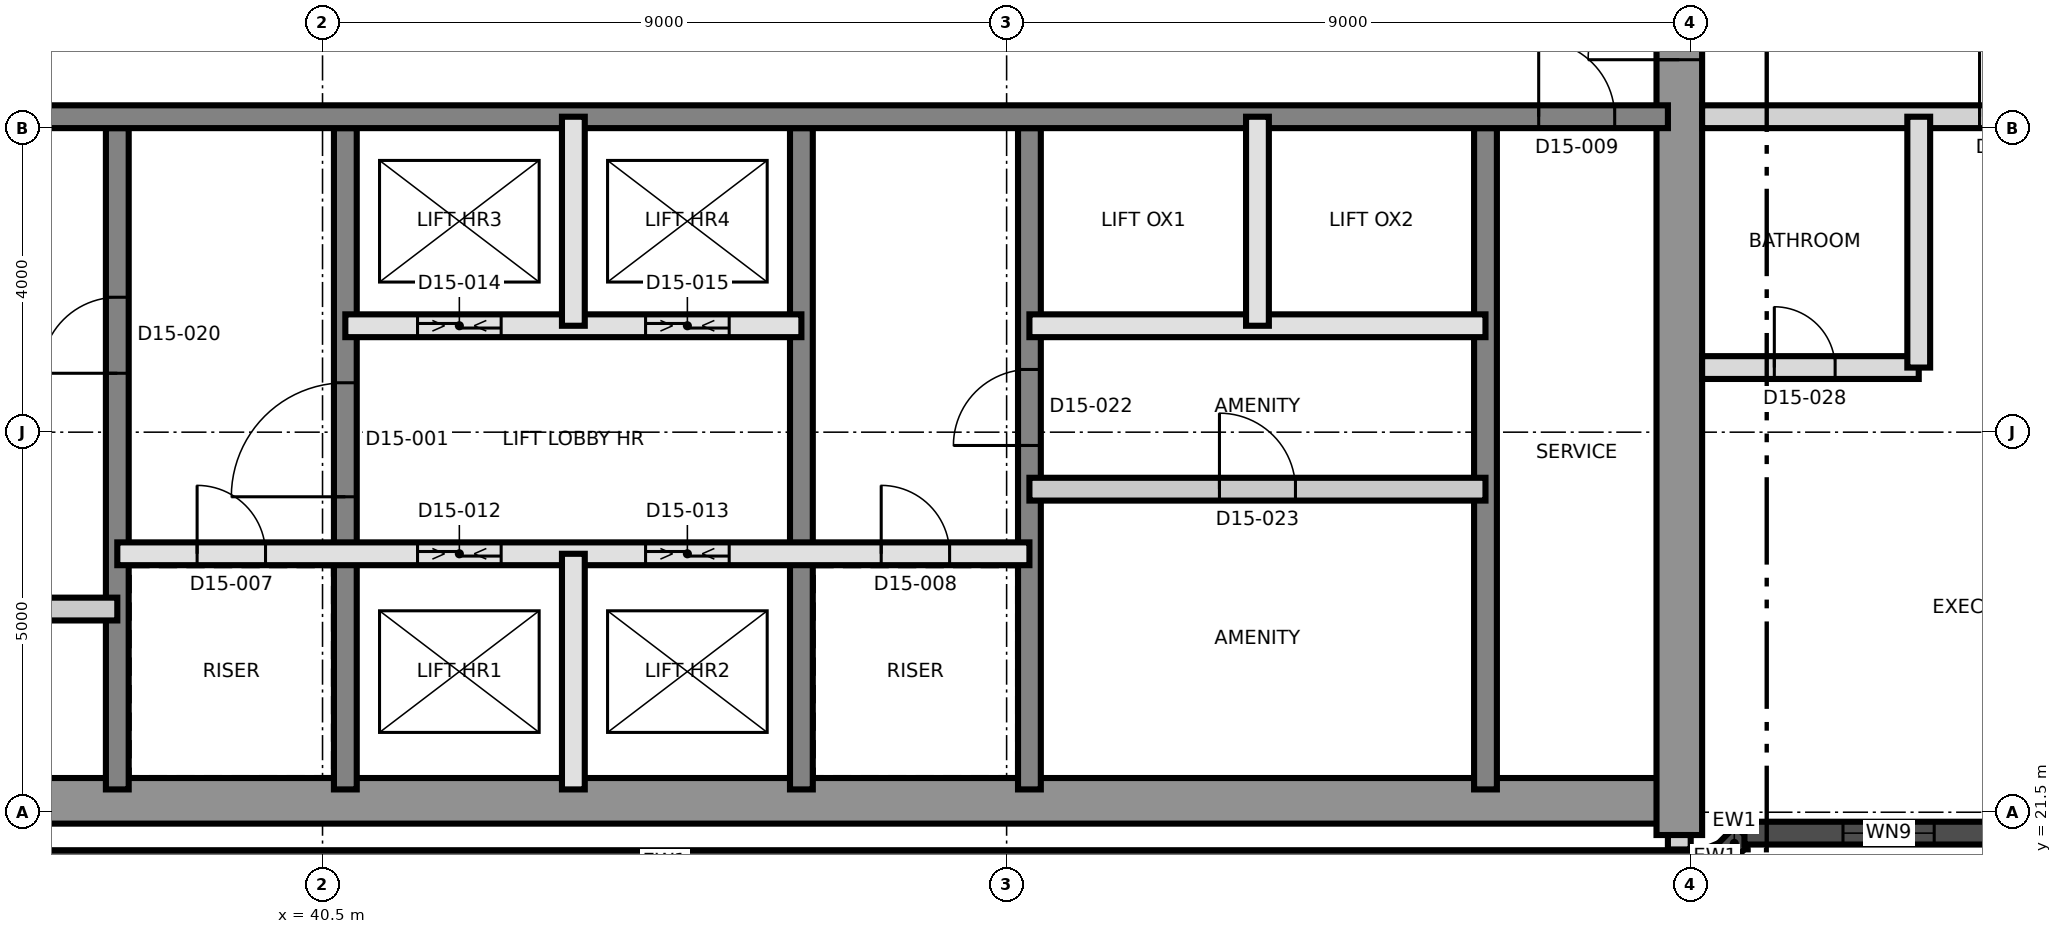
"""IFC4 building model, lengths in metres.
Left out: names, types, materials, properties, quantities, classifications, styles, units other than length and angle.
Written with IfcOpenShell. Run it as: python <this file> out.ifc"""

import sys

from ifc_helpers import new_model, si_unit, direction, frame, frame_2d, origin, place, context, subcontext, project, spatial, rectangle, extrude, element, fill, save


model = new_model("IFC4")
c1 = context("Model", 3, precision=1e-05, world=origin(), true_north=direction((0.0, 1.0)))
c2 = subcontext(c1, "Body", "Model", "MODEL_VIEW")
j1 = project(units=[si_unit("LENGTHUNIT", "METRE"), si_unit("PLANEANGLEUNIT", "RADIAN")], contexts=[c1])
p1 = place(None, origin())
s1 = spatial("IfcSite", under=j1, at=p1, CompositionType="ELEMENT")
p2 = place(p1, origin())
s2 = spatial("IfcBuilding", under=s1, at=p2, CompositionType="ELEMENT")
p3 = place(p2, frame((0.0, 0.0, 153.3)))
s3 = spatial("IfcBuildingStorey", under=s2, at=p3, CompositionType="ELEMENT", Elevation=153.3)
p4 = place(p3, frame((31.2, 21.65, 0.0), z_axis=(0.0, 0.0, 1.0), x_axis=(1.0, 0.0, 0.0)))
e1 = element("IfcWall", 1, at=p4, inside=s3, PredefinedType="SHEAR", context=c2, shape_type="SweptSolid", body=[
    extrude(rectangle(XDim=27.0, YDim=0.6, at=frame_2d((13.5, 0.0))), origin(), (0.0, 0.0, 1.0), 3.7),
])
p5 = place(p3, frame((58.35, 21.2, 0.0), z_axis=(0.0, 0.0, 1.0), x_axis=(0.0, 1.0, 0.0)))
e2 = element("IfcWall", 2, at=p5, inside=s3, PredefinedType="SHEAR", context=c2, shape_type="SweptSolid", body=[
    extrude(rectangle(XDim=18.6, YDim=0.6, at=frame_2d((9.3, 0.0))), origin(), (0.0, 0.0, 1.0), 3.7),
])
p6 = place(p5, frame((10.2, 0.0, 0.0)))
e3 = element("IfcOpeningElement", 3, at=p6, cuts=e2, PredefinedType="OPENING", context=c2, shape_type="SweptSolid", body=[
    extrude(rectangle(XDim=1.2, YDim=2.1, at=frame_2d((0.6, 1.05))), frame((0.0, 0.31, 0.0), z_axis=(0.0, -1.0, 0.0), x_axis=(1.0, 0.0, 0.0)), (0.0, 0.0, 1.0), 0.62),
])
p7 = place(p3, frame((37.8, 21.8, 0.0), z_axis=(0.0, 0.0, 1.0), x_axis=(0.0, 1.0, 0.0)))
e4 = element("IfcWall", 4, at=p7, inside=s3, PredefinedType="SHEAR", context=c2, shape_type="SweptSolid", body=[
    extrude(rectangle(XDim=8.7, YDim=0.3, at=frame_2d((4.35, 0.0))), origin(), (0.0, 0.0, 1.0), 3.7),
])
p8 = place(p7, frame((5.475, 0.0, 0.0)))
e5 = element("IfcOpeningElement", 5, at=p8, cuts=e4, PredefinedType="OPENING", context=c2, shape_type="SweptSolid", body=[
    extrude(rectangle(XDim=1.0, YDim=2.1, at=frame_2d((0.5, 1.05))), frame((0.0, 0.16, 0.0), z_axis=(0.0, -1.0, 0.0), x_axis=(1.0, 0.0, 0.0)), (0.0, 0.0, 1.0), 0.32),
])
p9 = place(p3, frame((40.8, 21.8, 0.0), z_axis=(0.0, 0.0, 1.0), x_axis=(0.0, 1.0, 0.0)))
e6 = element("IfcWall", 6, at=p9, inside=s3, PredefinedType="SHEAR", context=c2, shape_type="SweptSolid", body=[
    extrude(rectangle(XDim=8.7, YDim=0.3, at=frame_2d((4.35, 0.0))), origin(), (0.0, 0.0, 1.0), 3.7),
])
p10 = place(p9, frame((3.85, 0.0, 0.0)))
e7 = element("IfcOpeningElement", 7, at=p10, cuts=e6, PredefinedType="OPENING", context=c2, shape_type="SweptSolid", body=[
    extrude(rectangle(XDim=1.5, YDim=2.1, at=frame_2d((0.75, 1.05))), frame((0.0, 0.16, 0.0), z_axis=(0.0, -1.0, 0.0), x_axis=(1.0, 0.0, 0.0)), (0.0, 0.0, 1.0), 0.32),
])
p11 = place(p3, frame((46.8, 21.8, 0.0), z_axis=(0.0, 0.0, 1.0), x_axis=(0.0, 1.0, 0.0)))
e8 = element("IfcWall", 8, at=p11, inside=s3, PredefinedType="SHEAR", context=c2, shape_type="SweptSolid", body=[
    extrude(rectangle(XDim=8.7, YDim=0.3, at=frame_2d((4.35, 0.0))), origin(), (0.0, 0.0, 1.0), 3.7),
])
p12 = place(p3, frame((49.8, 21.8, 0.0), z_axis=(0.0, 0.0, 1.0), x_axis=(0.0, 1.0, 0.0)))
e9 = element("IfcWall", 9, at=p12, inside=s3, PredefinedType="SHEAR", context=c2, shape_type="SweptSolid", body=[
    extrude(rectangle(XDim=8.7, YDim=0.3, at=frame_2d((4.35, 0.0))), origin(), (0.0, 0.0, 1.0), 3.7),
])
p13 = place(p12, frame((4.525, 0.0, 0.0)))
e10 = element("IfcOpeningElement", 10, at=p13, cuts=e9, PredefinedType="OPENING", context=c2, shape_type="SweptSolid", body=[
    extrude(rectangle(XDim=1.0, YDim=2.1, at=frame_2d((0.5, 1.05))), frame((0.0, 0.16, 0.0), z_axis=(0.0, -1.0, 0.0), x_axis=(1.0, 0.0, 0.0)), (0.0, 0.0, 1.0), 0.32),
])
p14 = place(p3, frame((55.8, 21.8, 0.0), z_axis=(0.0, 0.0, 1.0), x_axis=(0.0, 1.0, 0.0)))
e11 = element("IfcWall", 11, at=p14, inside=s3, PredefinedType="SHEAR", context=c2, shape_type="SweptSolid", body=[
    extrude(rectangle(XDim=8.7, YDim=0.3, at=frame_2d((4.35, 0.0))), origin(), (0.0, 0.0, 1.0), 3.7),
])
p15 = place(p3, frame((31.8, 30.65, 0.0), z_axis=(0.0, 0.0, 1.0), x_axis=(1.0, 0.0, 0.0)))
e12 = element("IfcWall", 12, at=p15, inside=s3, PredefinedType="SHEAR", context=c2, shape_type="SweptSolid", body=[
    extrude(rectangle(XDim=26.4, YDim=0.3, at=frame_2d((13.2, 0.0))), origin(), (0.0, 0.0, 1.0), 3.7),
])
p16 = place(p15, frame((24.7, 0.0, 0.0)))
e13 = element("IfcOpeningElement", 13, at=p16, cuts=e12, PredefinedType="OPENING", context=c2, shape_type="SweptSolid", body=[
    extrude(rectangle(XDim=1.0, YDim=2.1, at=frame_2d((0.5, 1.05))), frame((0.0, 0.16, 0.0), z_axis=(0.0, -1.0, 0.0), x_axis=(1.0, 0.0, 0.0)), (0.0, 0.0, 1.0), 0.32),
])
p17 = place(p3, frame((31.36, 20.85, 0.0), z_axis=(0.0, 0.0, 1.0), x_axis=(1.0, 0.0, 0.0)))
e14 = element("IfcWall", 14, at=p17, inside=s3, PredefinedType="SOLIDWALL", context=c2, shape_type="SweptSolid", body=[
    extrude(rectangle(XDim=27.281, YDim=0.3, at=frame_2d((13.64, 0.0))), origin(), (0.0, 0.0, 1.0), 3.4),
])
p18 = place(p3, frame((58.698, 20.861, 0.0), z_axis=(0.0, 0.0, 1.0), x_axis=(0.923757413239, 0.38297812142, 0.0)))
e15 = element("IfcWall", 15, at=p18, inside=s3, PredefinedType="SOLIDWALL", context=c2, shape_type="SweptSolid", body=[
    extrude(rectangle(XDim=0.275, YDim=0.3, at=frame_2d((0.138, 0.0))), origin(), (0.0, 0.0, 1.0), 3.4),
])
p19 = place(p3, frame((58.952, 20.967, 0.0), z_axis=(0.0, 0.0, 1.0), x_axis=(0.702144810536, 0.712034174065, 0.0)))
e16 = element("IfcWall", 16, at=p19, inside=s3, PredefinedType="SOLIDWALL", context=c2, shape_type="SweptSolid", body=[
    extrude(rectangle(XDim=0.346, YDim=0.3, at=frame_2d((0.173, 0.0))), origin(), (0.0, 0.0, 1.0), 3.4),
])
p20 = place(p3, frame((59.207, 21.225, 0.0), z_axis=(0.0, 0.0, 1.0), x_axis=(1.0, 0.0, 0.0)))
e17 = element("IfcWall", 17, at=p20, inside=s3, PredefinedType="SOLIDWALL", context=c2, shape_type="SweptSolid", body=[
    extrude(rectangle(XDim=8.213, YDim=0.3, at=frame_2d((4.106, 0.0))), origin(), (0.0, 0.0, 1.0), 3.4),
])
p21 = place(p20, frame((1.297, 0.0, 0.9)))
e18 = element("IfcOpeningElement", 18, at=p21, cuts=e17, PredefinedType="OPENING", context=c2, shape_type="SweptSolid", body=[
    extrude(rectangle(XDim=1.2, YDim=1.5, at=frame_2d((0.6, 0.75))), frame((0.0, 0.16, 0.0), z_axis=(0.0, -1.0, 0.0), x_axis=(1.0, 0.0, 0.0)), (0.0, 0.0, 1.0), 0.32),
])
p22 = place(p20, frame((4.003, 0.0, 0.9)))
e19 = element("IfcOpeningElement", 19, at=p22, cuts=e17, PredefinedType="OPENING", context=c2, shape_type="SweptSolid", body=[
    extrude(rectangle(XDim=3.6, YDim=1.5, at=frame_2d((1.8, 0.75))), frame((0.0, 0.16, 0.0), z_axis=(0.0, -1.0, 0.0), x_axis=(1.0, 0.0, 0.0)), (0.0, 0.0, 1.0), 0.32),
])
p23 = place(p3, frame((31.8, 24.173, 0.0), z_axis=(0.0, 0.0, 1.0), x_axis=(1.0, 0.0, 0.0)))
e20 = element("IfcWall", 20, at=p23, inside=s3, PredefinedType="PARTITIONING", context=c2, shape_type="SweptSolid", body=[
    extrude(rectangle(XDim=6.0, YDim=0.3, at=frame_2d((3.0, 0.0))), origin(), (0.0, 0.0, 1.0), 3.4),
])
p24 = place(p23, frame((2.5, 0.0, 0.0)))
e21 = element("IfcOpeningElement", 21, at=p24, cuts=e20, PredefinedType="OPENING", context=c2, shape_type="SweptSolid", body=[
    extrude(rectangle(XDim=1.0, YDim=2.1, at=frame_2d((0.5, 1.05))), frame((0.0, 0.16, 0.0), z_axis=(0.0, -1.0, 0.0), x_axis=(1.0, 0.0, 0.0)), (0.0, 0.0, 1.0), 0.32),
])
p25 = place(p3, frame((37.8, 24.9, 0.0), z_axis=(0.0, 0.0, 1.0), x_axis=(1.0, 0.0, 0.0)))
e22 = element("IfcWall", 22, at=p25, inside=s3, PredefinedType="SOLIDWALL", context=c2, shape_type="SweptSolid", body=[
    extrude(rectangle(XDim=12.0, YDim=0.3, at=frame_2d((6.0, 0.0))), origin(), (0.0, 0.0, 1.0), 3.4),
])
p26 = place(p25, frame((1.05, 0.0, 0.0)))
e23 = element("IfcOpeningElement", 23, at=p26, cuts=e22, PredefinedType="OPENING", context=c2, shape_type="SweptSolid", body=[
    extrude(rectangle(XDim=0.9, YDim=2.1, at=frame_2d((0.45, 1.05))), frame((0.0, 0.16, 0.0), z_axis=(0.0, -1.0, 0.0), x_axis=(1.0, 0.0, 0.0)), (0.0, 0.0, 1.0), 0.32),
])
p27 = place(p25, frame((10.05, 0.0, 0.0)))
e24 = element("IfcOpeningElement", 24, at=p27, cuts=e22, PredefinedType="OPENING", context=c2, shape_type="SweptSolid", body=[
    extrude(rectangle(XDim=0.9, YDim=2.1, at=frame_2d((0.45, 1.05))), frame((0.0, 0.16, 0.0), z_axis=(0.0, -1.0, 0.0), x_axis=(1.0, 0.0, 0.0)), (0.0, 0.0, 1.0), 0.32),
])
p28 = place(p25, frame((3.95, 0.0, 0.0)))
e25 = element("IfcOpeningElement", 25, at=p28, cuts=e22, PredefinedType="OPENING", context=c2, shape_type="SweptSolid", body=[
    extrude(rectangle(XDim=1.1, YDim=2.4, at=frame_2d((0.55, 1.2))), frame((0.0, 0.16, 0.0), z_axis=(0.0, -1.0, 0.0), x_axis=(1.0, 0.0, 0.0)), (0.0, 0.0, 1.0), 0.32),
])
p29 = place(p25, frame((6.95, 0.0, 0.0)))
e26 = element("IfcOpeningElement", 26, at=p29, cuts=e22, PredefinedType="OPENING", context=c2, shape_type="SweptSolid", body=[
    extrude(rectangle(XDim=1.1, YDim=2.4, at=frame_2d((0.55, 1.2))), frame((0.0, 0.16, 0.0), z_axis=(0.0, -1.0, 0.0), x_axis=(1.0, 0.0, 0.0)), (0.0, 0.0, 1.0), 0.32),
])
p30 = place(p3, frame((49.8, 25.75, 0.0), z_axis=(0.0, 0.0, 1.0), x_axis=(1.0, 0.0, 0.0)))
e27 = element("IfcWall", 27, at=p30, inside=s3, PredefinedType="PARTITIONING", context=c2, shape_type="SweptSolid", body=[
    extrude(rectangle(XDim=6.0, YDim=0.3, at=frame_2d((3.0, 0.0))), origin(), (0.0, 0.0, 1.0), 3.4),
])
p31 = place(p30, frame((2.5, 0.0, 0.0)))
e28 = element("IfcOpeningElement", 28, at=p31, cuts=e27, PredefinedType="OPENING", context=c2, shape_type="SweptSolid", body=[
    extrude(rectangle(XDim=1.0, YDim=2.1, at=frame_2d((0.5, 1.05))), frame((0.0, 0.16, 0.0), z_axis=(0.0, -1.0, 0.0), x_axis=(1.0, 0.0, 0.0)), (0.0, 0.0, 1.0), 0.32),
])
p32 = place(p3, frame((40.8, 27.9, 0.0), z_axis=(0.0, 0.0, 1.0), x_axis=(1.0, 0.0, 0.0)))
e29 = element("IfcWall", 29, at=p32, inside=s3, PredefinedType="SOLIDWALL", context=c2, shape_type="SweptSolid", body=[
    extrude(rectangle(XDim=6.0, YDim=0.3, at=frame_2d((3.0, 0.0))), origin(), (0.0, 0.0, 1.0), 3.4),
])
p33 = place(p32, frame((0.95, 0.0, 0.0)))
e30 = element("IfcOpeningElement", 30, at=p33, cuts=e29, PredefinedType="OPENING", context=c2, shape_type="SweptSolid", body=[
    extrude(rectangle(XDim=1.1, YDim=2.4, at=frame_2d((0.55, 1.2))), frame((0.0, 0.16, 0.0), z_axis=(0.0, -1.0, 0.0), x_axis=(1.0, 0.0, 0.0)), (0.0, 0.0, 1.0), 0.32),
])
p34 = place(p32, frame((3.95, 0.0, 0.0)))
e31 = element("IfcOpeningElement", 31, at=p34, cuts=e29, PredefinedType="OPENING", context=c2, shape_type="SweptSolid", body=[
    extrude(rectangle(XDim=1.1, YDim=2.4, at=frame_2d((0.55, 1.2))), frame((0.0, 0.16, 0.0), z_axis=(0.0, -1.0, 0.0), x_axis=(1.0, 0.0, 0.0)), (0.0, 0.0, 1.0), 0.32),
])
p35 = place(p3, frame((49.8, 27.9, 0.0), z_axis=(0.0, 0.0, 1.0), x_axis=(1.0, 0.0, 0.0)))
e32 = element("IfcWall", 32, at=p35, inside=s3, PredefinedType="SOLIDWALL", context=c2, shape_type="SweptSolid", body=[
    extrude(rectangle(XDim=6.0, YDim=0.3, at=frame_2d((3.0, 0.0))), origin(), (0.0, 0.0, 1.0), 3.4),
])
p36 = place(p3, frame((43.8, 21.8, 0.0), z_axis=(0.0, 0.0, 1.0), x_axis=(0.0, 1.0, 0.0)))
e33 = element("IfcWall", 33, at=p36, inside=s3, PredefinedType="SOLIDWALL", context=c2, shape_type="SweptSolid", body=[
    extrude(rectangle(XDim=3.1, YDim=0.3, at=frame_2d((1.55, 0.0))), origin(), (0.0, 0.0, 1.0), 3.4),
])
for number, where, z_axis, x_axis in (
    (34, (43.8, 27.9, 0.0), (0.0, 0.0, 1.0), (0.0, 1.0, 0.0)),
    (35, (52.8, 27.9, 0.0), (0.0, 0.0, 1.0), (0.0, 1.0, 0.0)),
):
    element("IfcWall", number, at=place(p3, frame(where, z_axis=z_axis, x_axis=x_axis)), inside=s3, PredefinedType="SOLIDWALL", context=c2, shape_type="SweptSolid", body=[
        extrude(rectangle(XDim=2.75, YDim=0.3, at=frame_2d((1.375, 0.0))), origin(), (0.0, 0.0, 1.0), 3.4),
    ])
p37 = place(p3, frame((58.65, 27.35, 0.0), z_axis=(0.0, 0.0, 1.0), x_axis=(1.0, 0.0, 0.0)))
e36 = element("IfcWall", 36, at=p37, inside=s3, PredefinedType="PARTITIONING", context=c2, shape_type="SweptSolid", body=[
    extrude(rectangle(XDim=2.85, YDim=0.3, at=frame_2d((1.425, 0.0))), origin(), (0.0, 0.0, 1.0), 3.4),
])
p38 = place(p37, frame((0.95, 0.0, 0.0)))
e37 = element("IfcOpeningElement", 37, at=p38, cuts=e36, PredefinedType="OPENING", context=c2, shape_type="SweptSolid", body=[
    extrude(rectangle(XDim=0.8, YDim=2.1, at=frame_2d((0.4, 1.05))), frame((0.0, 0.16, 0.0), z_axis=(0.0, -1.0, 0.0), x_axis=(1.0, 0.0, 0.0)), (0.0, 0.0, 1.0), 0.32),
])
p39 = place(p3, frame((58.65, 30.65, 0.0), z_axis=(0.0, 0.0, 1.0), x_axis=(1.0, 0.0, 0.0)))
e38 = element("IfcWall", 38, at=p39, inside=s3, PredefinedType="PARTITIONING", context=c2, shape_type="SweptSolid", body=[
    extrude(rectangle(XDim=8.5, YDim=0.3, at=frame_2d((4.25, 0.0))), origin(), (0.0, 0.0, 1.0), 3.4),
])
p40 = place(p39, frame((3.65, 0.0, 0.0)))
e39 = element("IfcOpeningElement", 39, at=p40, cuts=e38, PredefinedType="OPENING", context=c2, shape_type="SweptSolid", body=[
    extrude(rectangle(XDim=1.0, YDim=2.4, at=frame_2d((0.5, 1.2))), frame((0.0, 0.16, 0.0), z_axis=(0.0, -1.0, 0.0), x_axis=(1.0, 0.0, 0.0)), (0.0, 0.0, 1.0), 0.32),
])
p41 = place(p3, frame((61.5, 27.35, 0.0), z_axis=(0.0, 0.0, 1.0), x_axis=(0.0, 1.0, 0.0)))
e40 = element("IfcWall", 40, at=p41, inside=s3, PredefinedType="PARTITIONING", context=c2, shape_type="SweptSolid", body=[
    extrude(rectangle(XDim=3.3, YDim=0.3, at=frame_2d((1.65, 0.0))), origin(), (0.0, 0.0, 1.0), 3.4),
])
p42 = place(p3, frame((58.35, 21.2, 0.0), z_axis=(0.0, 0.0, 1.0), x_axis=(0.0, -1.0, 0.0)))
e41 = element("IfcWall", 41, at=p42, inside=s3, PredefinedType="PARTITIONING", context=c2, shape_type="SweptSolid", body=[
    extrude(rectangle(XDim=0.19, YDim=0.3, at=frame_2d((0.095, 0.0))), origin(), (0.0, 0.0, 1.0), 3.4),
])
p43 = place(p21, origin())
e42 = element("IfcWindow", 42, at=p43, inside=s3, PartitioningType="SINGLE_PANEL", PredefinedType="WINDOW", context=c2, shape_type="SweptSolid", body=[
    extrude(rectangle(XDim=1.2, YDim=1.5, at=frame_2d((0.6, 0.75))), frame((0.0, 0.03, 0.0), z_axis=(0.0, -1.0, 0.0), x_axis=(1.0, 0.0, 0.0)), (0.0, 0.0, 1.0), 0.06),
])
fill(e18, e42)
p44 = place(p10, origin())
e43 = element("IfcDoor", 43, at=p44, inside=s3, OperationType="SINGLE_SWING_RIGHT", PredefinedType="DOOR", context=c2, shape_type="SweptSolid", body=[
    extrude(rectangle(XDim=1.5, YDim=2.1, at=frame_2d((0.75, 1.05))), frame((0.0, 0.025, 0.0), z_axis=(0.0, -1.0, 0.0), x_axis=(1.0, 0.0, 0.0)), (0.0, 0.0, 1.0), 0.05),
])
fill(e7, e43)
p45 = place(p26, origin())
e44 = element("IfcDoor", 44, at=p45, inside=s3, OperationType="SINGLE_SWING_LEFT", PredefinedType="DOOR", context=c2, shape_type="SweptSolid", body=[
    extrude(rectangle(XDim=0.9, YDim=2.1, at=frame_2d((0.45, 1.05))), frame((0.0, 0.025, 0.0), z_axis=(0.0, -1.0, 0.0), x_axis=(1.0, 0.0, 0.0)), (0.0, 0.0, 1.0), 0.05),
])
fill(e23, e44)
p46 = place(p27, origin())
e45 = element("IfcDoor", 45, at=p46, inside=s3, OperationType="SINGLE_SWING_RIGHT", PredefinedType="DOOR", context=c2, shape_type="SweptSolid", body=[
    extrude(rectangle(XDim=0.9, YDim=2.1, at=frame_2d((0.45, 1.05))), frame((0.0, 0.025, 0.0), z_axis=(0.0, -1.0, 0.0), x_axis=(1.0, 0.0, 0.0)), (0.0, 0.0, 1.0), 0.05),
])
fill(e24, e45)
p47 = place(p16, origin())
e46 = element("IfcDoor", 46, at=p47, inside=s3, OperationType="SINGLE_SWING_LEFT", PredefinedType="DOOR", context=c2, shape_type="SweptSolid", body=[
    extrude(rectangle(XDim=1.0, YDim=2.1, at=frame_2d((0.5, 1.05))), frame((0.0, 0.025, 0.0), z_axis=(0.0, -1.0, 0.0), x_axis=(1.0, 0.0, 0.0)), (0.0, 0.0, 1.0), 0.05),
])
fill(e13, e46)
p48 = place(p6, origin())
e47 = element("IfcDoor", 47, at=p48, inside=s3, OperationType="SINGLE_SWING_LEFT", PredefinedType="DOOR", context=c2, shape_type="SweptSolid", body=[
    extrude(rectangle(XDim=1.2, YDim=2.1, at=frame_2d((0.6, 1.05))), frame((0.0, 0.025, 0.0), z_axis=(0.0, -1.0, 0.0), x_axis=(1.0, 0.0, 0.0)), (0.0, 0.0, 1.0), 0.05),
])
fill(e3, e47)
p49 = place(p28, origin())
e48 = element("IfcDoor", 48, at=p49, inside=s3, OperationType="SLIDING_TO_LEFT", PredefinedType="DOOR", context=c2, shape_type="SweptSolid", body=[
    extrude(rectangle(XDim=1.1, YDim=2.4, at=frame_2d((0.55, 1.2))), frame((0.0, 0.025, 0.0), z_axis=(0.0, -1.0, 0.0), x_axis=(1.0, 0.0, 0.0)), (0.0, 0.0, 1.0), 0.05),
])
fill(e25, e48)
p50 = place(p29, origin())
e49 = element("IfcDoor", 49, at=p50, inside=s3, OperationType="SLIDING_TO_LEFT", PredefinedType="DOOR", context=c2, shape_type="SweptSolid", body=[
    extrude(rectangle(XDim=1.1, YDim=2.4, at=frame_2d((0.55, 1.2))), frame((0.0, 0.025, 0.0), z_axis=(0.0, -1.0, 0.0), x_axis=(1.0, 0.0, 0.0)), (0.0, 0.0, 1.0), 0.05),
])
fill(e26, e49)
p51 = place(p33, origin())
e50 = element("IfcDoor", 50, at=p51, inside=s3, OperationType="SLIDING_TO_LEFT", PredefinedType="DOOR", context=c2, shape_type="SweptSolid", body=[
    extrude(rectangle(XDim=1.1, YDim=2.4, at=frame_2d((0.55, 1.2))), frame((0.0, 0.025, 0.0), z_axis=(0.0, -1.0, 0.0), x_axis=(1.0, 0.0, 0.0)), (0.0, 0.0, 1.0), 0.05),
])
fill(e30, e50)
p52 = place(p34, origin())
e51 = element("IfcDoor", 51, at=p52, inside=s3, OperationType="SLIDING_TO_LEFT", PredefinedType="DOOR", context=c2, shape_type="SweptSolid", body=[
    extrude(rectangle(XDim=1.1, YDim=2.4, at=frame_2d((0.55, 1.2))), frame((0.0, 0.025, 0.0), z_axis=(0.0, -1.0, 0.0), x_axis=(1.0, 0.0, 0.0)), (0.0, 0.0, 1.0), 0.05),
])
fill(e31, e51)
p53 = place(p8, origin())
e52 = element("IfcDoor", 52, at=p53, inside=s3, OperationType="SINGLE_SWING_LEFT", PredefinedType="DOOR", context=c2, shape_type="SweptSolid", body=[
    extrude(rectangle(XDim=1.0, YDim=2.1, at=frame_2d((0.5, 1.05))), frame((0.0, 0.025, 0.0), z_axis=(0.0, -1.0, 0.0), x_axis=(1.0, 0.0, 0.0)), (0.0, 0.0, 1.0), 0.05),
])
fill(e5, e52)
p54 = place(p13, origin())
e53 = element("IfcDoor", 53, at=p54, inside=s3, OperationType="SINGLE_SWING_LEFT", PredefinedType="DOOR", context=c2, shape_type="SweptSolid", body=[
    extrude(rectangle(XDim=1.0, YDim=2.1, at=frame_2d((0.5, 1.05))), frame((0.0, 0.025, 0.0), z_axis=(0.0, -1.0, 0.0), x_axis=(1.0, 0.0, 0.0)), (0.0, 0.0, 1.0), 0.05),
])
fill(e10, e53)
p55 = place(p31, origin())
e54 = element("IfcDoor", 54, at=p55, inside=s3, OperationType="SINGLE_SWING_RIGHT", PredefinedType="DOOR", context=c2, shape_type="SweptSolid", body=[
    extrude(rectangle(XDim=1.0, YDim=2.1, at=frame_2d((0.5, 1.05))), frame((0.0, 0.025, 0.0), z_axis=(0.0, -1.0, 0.0), x_axis=(1.0, 0.0, 0.0)), (0.0, 0.0, 1.0), 0.05),
])
fill(e28, e54)
p56 = place(p38, origin())
e55 = element("IfcDoor", 55, at=p56, inside=s3, OperationType="SINGLE_SWING_LEFT", PredefinedType="DOOR", context=c2, shape_type="SweptSolid", body=[
    extrude(rectangle(XDim=0.8, YDim=2.1, at=frame_2d((0.4, 1.05))), frame((0.0, 0.025, 0.0), z_axis=(0.0, -1.0, 0.0), x_axis=(1.0, 0.0, 0.0)), (0.0, 0.0, 1.0), 0.05),
])
fill(e37, e55)
p57 = place(p40, origin())
e56 = element("IfcDoor", 56, at=p57, inside=s3, OperationType="SINGLE_SWING_LEFT", PredefinedType="DOOR", context=c2, shape_type="SweptSolid", body=[
    extrude(rectangle(XDim=1.0, YDim=2.4, at=frame_2d((0.5, 1.2))), frame((0.0, 0.025, 0.0), z_axis=(0.0, -1.0, 0.0), x_axis=(1.0, 0.0, 0.0)), (0.0, 0.0, 1.0), 0.05),
])
fill(e39, e56)
save(model, sys.argv[1])
